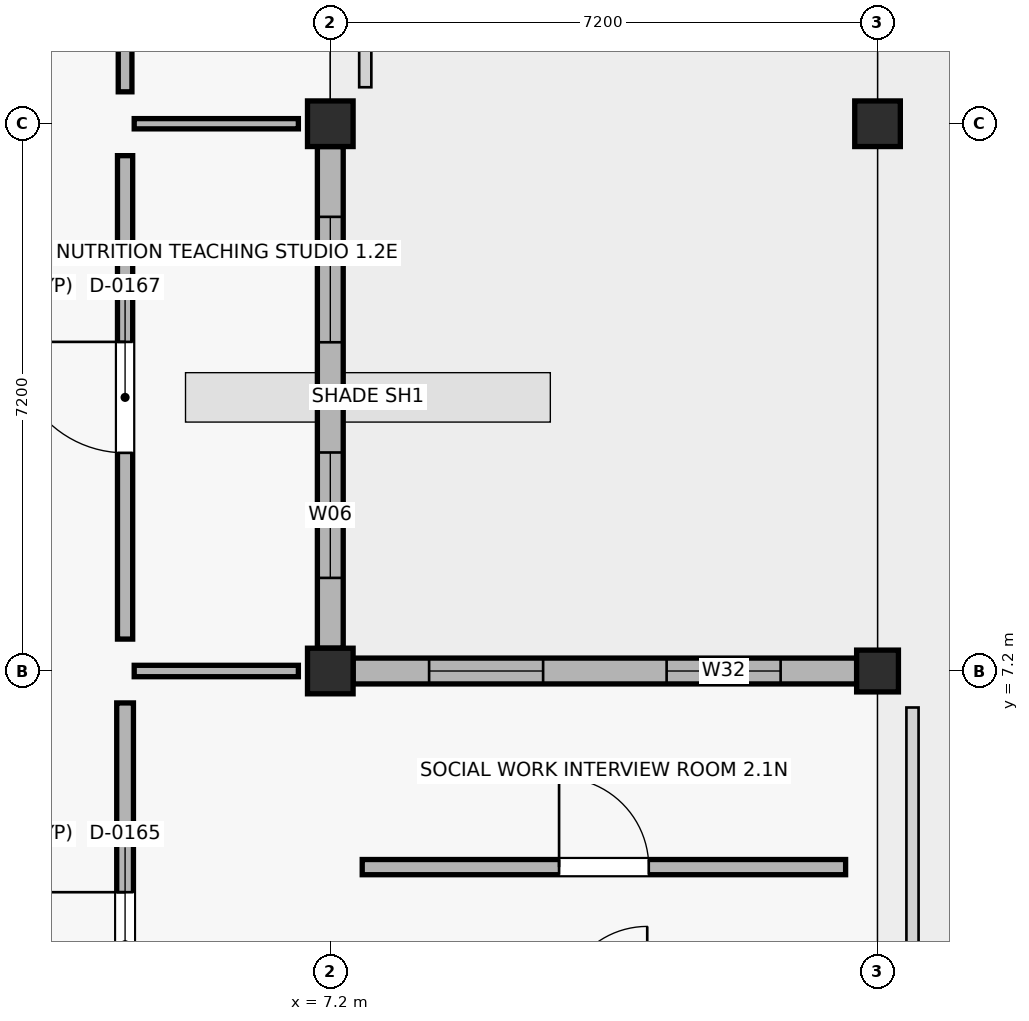
"""IFC4 building model, lengths in metres.
Left out: names, types, materials, properties, quantities, classifications, styles, units other than length and angle.
Written with IfcOpenShell. Run it as: python <this file> out.ifc"""

import sys

from ifc_helpers import new_model, si_unit, direction, frame, frame_2d, origin, origin_2d, place, context, subcontext, project, spatial, rectangle, extrude, element, fill, save


model = new_model("IFC4")
c1 = context("Model", 3, precision=1e-05, world=origin(), true_north=direction((0.0, 1.0)))
c2 = subcontext(c1, "Body", "Model", "MODEL_VIEW")
j1 = project(units=[si_unit("LENGTHUNIT", "METRE"), si_unit("PLANEANGLEUNIT", "RADIAN")], contexts=[c1])
p1 = place(None, origin())
s1 = spatial("IfcSite", under=j1, at=p1, CompositionType="ELEMENT")
p2 = place(p1, origin())
s2 = spatial("IfcBuilding", under=s1, at=p2, CompositionType="ELEMENT")
p3 = place(p2, origin())
s3 = spatial("IfcBuildingStorey", under=s2, at=p3, CompositionType="ELEMENT", Elevation=0.0)
for number, where, z_axis, x_axis in (
    (1, (7.2, 7.2, -0.25), (0.0, 0.0, 1.0), (1.0, 0.0, 0.0)),
    (2, (7.2, 14.4, -0.25), (0.0, 0.0, 1.0), (1.0, 0.0, 0.0)),
):
    element("IfcColumn", number, at=place(p3, frame(where, z_axis=z_axis, x_axis=x_axis)), inside=s3, PredefinedType="COLUMN", context=c2, shape_type="SweptSolid", body=[
        extrude(rectangle(XDim=0.6, YDim=0.6, at=origin_2d()), origin(), (0.0, 0.0, 1.0), 4.75),
    ])
p4 = place(p3, frame((14.4, 7.2, -0.25), z_axis=(0.0, 0.0, 1.0), x_axis=(1.0, 0.0, 0.0)))
e3 = element("IfcColumn", 3, at=p4, inside=s3, PredefinedType="COLUMN", context=c2, shape_type="SweptSolid", body=[
    extrude(rectangle(XDim=0.55, YDim=0.55, at=origin_2d()), origin(), (0.0, 0.0, 1.0), 4.75),
])
p5 = place(p3, frame((14.4, 14.4, -0.25), z_axis=(0.0, 0.0, 1.0), x_axis=(1.0, 0.0, 0.0)))
e4 = element("IfcColumn", 4, at=p5, inside=s3, PredefinedType="COLUMN", context=c2, shape_type="SweptSolid", body=[
    extrude(rectangle(XDim=0.6, YDim=0.6, at=origin_2d()), origin(), (0.0, 0.0, 1.0), 4.75),
])
p6 = place(p3, frame((7.2, 7.5, 0.0), z_axis=(0.0, 0.0, 1.0), x_axis=(0.0, 1.0, 0.0)))
e5 = element("IfcWall", 5, at=p6, inside=s3, PredefinedType="SOLIDWALL", context=c2, shape_type="SweptSolid", body=[
    extrude(rectangle(XDim=6.6, YDim=0.34, at=frame_2d((3.3, 0.0))), origin(), (0.0, 0.0, 1.0), 3.52),
])
p7 = place(p6, frame((0.925, 0.0, 0.9)))
e6 = element("IfcOpeningElement", 6, at=p7, cuts=e5, PredefinedType="OPENING", context=c2, shape_type="SweptSolid", body=[
    extrude(rectangle(XDim=1.65, YDim=1.25, at=frame_2d((0.825, 0.625))), frame((0.0, 0.18, 0.0), z_axis=(0.0, -1.0, 0.0), x_axis=(1.0, 0.0, 0.0)), (0.0, 0.0, 1.0), 0.36),
])
p8 = place(p6, frame((4.025, 0.0, 0.9)))
e7 = element("IfcOpeningElement", 7, at=p8, cuts=e5, PredefinedType="OPENING", context=c2, shape_type="SweptSolid", body=[
    extrude(rectangle(XDim=1.65, YDim=1.25, at=frame_2d((0.825, 0.625))), frame((0.0, 0.18, 0.0), z_axis=(0.0, -1.0, 0.0), x_axis=(1.0, 0.0, 0.0)), (0.0, 0.0, 1.0), 0.36),
])
p9 = place(p3, frame((14.125, 7.2, 0.0), z_axis=(0.0, 0.0, 1.0), x_axis=(-1.0, 0.0, 0.0)))
e8 = element("IfcWall", 8, at=p9, inside=s3, PredefinedType="SOLIDWALL", context=c2, shape_type="SweptSolid", body=[
    extrude(rectangle(XDim=6.625, YDim=0.34, at=frame_2d((3.312, 0.0))), origin(), (0.0, 0.0, 1.0), 3.47),
])
p10 = place(p9, frame((1.0, 0.0, 0.9)))
e9 = element("IfcOpeningElement", 9, at=p10, cuts=e8, PredefinedType="OPENING", context=c2, shape_type="SweptSolid", body=[
    extrude(rectangle(XDim=1.5, YDim=1.62, at=frame_2d((0.75, 0.81))), frame((0.0, 0.18, 0.0), z_axis=(0.0, -1.0, 0.0), x_axis=(1.0, 0.0, 0.0)), (0.0, 0.0, 1.0), 0.36),
])
p11 = place(p9, frame((4.125, 0.0, 0.9)))
e10 = element("IfcOpeningElement", 10, at=p11, cuts=e8, PredefinedType="OPENING", context=c2, shape_type="SweptSolid", body=[
    extrude(rectangle(XDim=1.5, YDim=1.62, at=frame_2d((0.75, 0.81))), frame((0.0, 0.18, 0.0), z_axis=(0.0, -1.0, 0.0), x_axis=(1.0, 0.0, 0.0)), (0.0, 0.0, 1.0), 0.36),
])
p12 = place(p3, frame((4.5, 0.42, 0.0), z_axis=(0.0, 0.0, 1.0), x_axis=(0.0, 1.0, 0.0)))
e11 = element("IfcWall", 11, at=p12, inside=s3, PredefinedType="SOLIDWALL", context=c2, shape_type="SweptSolid", body=[
    extrude(rectangle(XDim=6.36, YDim=0.22, at=frame_2d((3.18, 0.0))), origin(), (0.0, 0.0, 1.0), 3.36),
])
p13 = place(p12, frame((2.49, 0.0, 0.0)))
e12 = element("IfcOpeningElement", 12, at=p13, cuts=e11, PredefinedType="OPENING", context=c2, shape_type="SweptSolid", body=[
    extrude(rectangle(XDim=1.38, YDim=2.04, at=frame_2d((0.69, 1.02))), frame((0.0, 0.12, 0.0), z_axis=(0.0, -1.0, 0.0), x_axis=(1.0, 0.0, 0.0)), (0.0, 0.0, 1.0), 0.24),
])
p14 = place(p3, frame((4.62, 7.2, 0.0), z_axis=(0.0, 0.0, 1.0), x_axis=(1.0, 0.0, 0.0)))
e13 = element("IfcWall", 13, at=p14, inside=s3, PredefinedType="PARTITIONING", context=c2, shape_type="SweptSolid", body=[
    extrude(rectangle(XDim=2.16, YDim=0.15, at=frame_2d((1.08, 0.0))), origin(), (0.0, 0.0, 1.0), 3.36),
])
p15 = place(p3, frame((4.5, 7.62, 0.0), z_axis=(0.0, 0.0, 1.0), x_axis=(0.0, 1.0, 0.0)))
e14 = element("IfcWall", 14, at=p15, inside=s3, PredefinedType="SOLIDWALL", context=c2, shape_type="SweptSolid", body=[
    extrude(rectangle(XDim=6.36, YDim=0.2, at=frame_2d((3.18, 0.0))), origin(), (0.0, 0.0, 1.0), 3.36),
])
p16 = place(p15, frame((2.45, 0.0, 0.0)))
e15 = element("IfcOpeningElement", 15, at=p16, cuts=e14, PredefinedType="OPENING", context=c2, shape_type="SweptSolid", body=[
    extrude(rectangle(XDim=1.46, YDim=2.04, at=frame_2d((0.73, 1.02))), frame((0.0, 0.11, 0.0), z_axis=(0.0, -1.0, 0.0), x_axis=(1.0, 0.0, 0.0)), (0.0, 0.0, 1.0), 0.22),
])
p17 = place(p3, frame((4.62, 14.4, 0.0), z_axis=(0.0, 0.0, 1.0), x_axis=(1.0, 0.0, 0.0)))
e16 = element("IfcWall", 16, at=p17, inside=s3, PredefinedType="PARTITIONING", context=c2, shape_type="SweptSolid", body=[
    extrude(rectangle(XDim=2.16, YDim=0.135, at=frame_2d((1.08, 0.0))), origin(), (0.0, 0.0, 1.0), 3.36),
])
p18 = place(p3, frame((4.5, 14.82, 0.0), z_axis=(0.0, 0.0, 1.0), x_axis=(0.0, 1.0, 0.0)))
e17 = element("IfcWall", 17, at=p18, inside=s3, PredefinedType="PARTITIONING", context=c2, shape_type="SweptSolid", body=[
    extrude(rectangle(XDim=6.36, YDim=0.18, at=frame_2d((3.18, 0.0))), origin(), (0.0, 0.0, 1.0), 3.36),
])
p19 = place(p18, frame((2.73, 0.0, 0.0)))
e18 = element("IfcOpeningElement", 18, at=p19, cuts=e17, PredefinedType="OPENING", context=c2, shape_type="SweptSolid", body=[
    extrude(rectangle(XDim=0.9, YDim=2.09, at=frame_2d((0.45, 1.045))), frame((0.0, 0.1, 0.0), z_axis=(0.0, -1.0, 0.0), x_axis=(1.0, 0.0, 0.0)), (0.0, 0.0, 1.0), 0.2),
])
p20 = place(p3, frame((7.62, 4.62, 0.0), z_axis=(0.0, 0.0, 1.0), x_axis=(1.0, 0.0, 0.0)))
e19 = element("IfcWall", 19, at=p20, inside=s3, PredefinedType="SOLIDWALL", context=c2, shape_type="SweptSolid", body=[
    extrude(rectangle(XDim=6.36, YDim=0.2, at=frame_2d((3.18, 0.0))), origin(), (0.0, 0.0, 1.0), 3.36),
])
p21 = place(p20, frame((2.59, 0.0, 0.0)))
e20 = element("IfcOpeningElement", 20, at=p21, cuts=e19, PredefinedType="OPENING", context=c2, shape_type="SweptSolid", body=[
    extrude(rectangle(XDim=1.18, YDim=2.09, at=frame_2d((0.59, 1.045))), frame((0.0, 0.11, 0.0), z_axis=(0.0, -1.0, 0.0), x_axis=(1.0, 0.0, 0.0)), (0.0, 0.0, 1.0), 0.22),
])
p22 = place(p7, origin())
e21 = element("IfcWindow", 21, at=p22, inside=s3, PartitioningType="SINGLE_PANEL", PredefinedType="WINDOW", context=c2, shape_type="SweptSolid", body=[
    extrude(rectangle(XDim=1.65, YDim=1.25, at=frame_2d((0.825, 0.625))), frame((0.0, 0.03, 0.0), z_axis=(0.0, -1.0, 0.0), x_axis=(1.0, 0.0, 0.0)), (0.0, 0.0, 1.0), 0.06),
])
fill(e6, e21)
p23 = place(p8, origin())
e22 = element("IfcWindow", 22, at=p23, inside=s3, PartitioningType="SINGLE_PANEL", PredefinedType="WINDOW", context=c2, shape_type="SweptSolid", body=[
    extrude(rectangle(XDim=1.65, YDim=1.25, at=frame_2d((0.825, 0.625))), frame((0.0, 0.03, 0.0), z_axis=(0.0, -1.0, 0.0), x_axis=(1.0, 0.0, 0.0)), (0.0, 0.0, 1.0), 0.06),
])
fill(e7, e22)
p24 = place(p10, origin())
e23 = element("IfcWindow", 23, at=p24, inside=s3, PartitioningType="SINGLE_PANEL", PredefinedType="WINDOW", context=c2, shape_type="SweptSolid", body=[
    extrude(rectangle(XDim=1.5, YDim=1.62, at=frame_2d((0.75, 0.81))), frame((0.0, 0.03, 0.0), z_axis=(0.0, -1.0, 0.0), x_axis=(1.0, 0.0, 0.0)), (0.0, 0.0, 1.0), 0.06),
])
fill(e9, e23)
p25 = place(p11, origin())
e24 = element("IfcWindow", 24, at=p25, inside=s3, PartitioningType="SINGLE_PANEL", PredefinedType="WINDOW", context=c2, shape_type="SweptSolid", body=[
    extrude(rectangle(XDim=1.5, YDim=1.62, at=frame_2d((0.75, 0.81))), frame((0.0, 0.03, 0.0), z_axis=(0.0, -1.0, 0.0), x_axis=(1.0, 0.0, 0.0)), (0.0, 0.0, 1.0), 0.06),
])
fill(e10, e24)
p26 = place(p13, origin())
e25 = element("IfcDoor", 25, at=p26, inside=s3, OperationType="SINGLE_SWING_RIGHT", PredefinedType="DOOR", context=c2, shape_type="SweptSolid", body=[
    extrude(rectangle(XDim=1.38, YDim=2.04, at=frame_2d((0.69, 1.02))), frame((0.0, 0.025, 0.0), z_axis=(0.0, -1.0, 0.0), x_axis=(1.0, 0.0, 0.0)), (0.0, 0.0, 1.0), 0.05),
])
fill(e12, e25)
p27 = place(p16, origin())
e26 = element("IfcDoor", 26, at=p27, inside=s3, OperationType="SINGLE_SWING_RIGHT", PredefinedType="DOOR", context=c2, shape_type="SweptSolid", body=[
    extrude(rectangle(XDim=1.46, YDim=2.04, at=frame_2d((0.73, 1.02))), frame((0.0, 0.025, 0.0), z_axis=(0.0, -1.0, 0.0), x_axis=(1.0, 0.0, 0.0)), (0.0, 0.0, 1.0), 0.05),
])
fill(e15, e26)
p28 = place(p21, origin())
e27 = element("IfcDoor", 27, at=p28, inside=s3, OperationType="SINGLE_SWING_LEFT", PredefinedType="DOOR", context=c2, shape_type="SweptSolid", body=[
    extrude(rectangle(XDim=1.18, YDim=2.09, at=frame_2d((0.59, 1.045))), frame((0.0, 0.025, 0.0), z_axis=(0.0, -1.0, 0.0), x_axis=(1.0, 0.0, 0.0)), (0.0, 0.0, 1.0), 0.05),
])
fill(e20, e27)
save(model, sys.argv[1])
